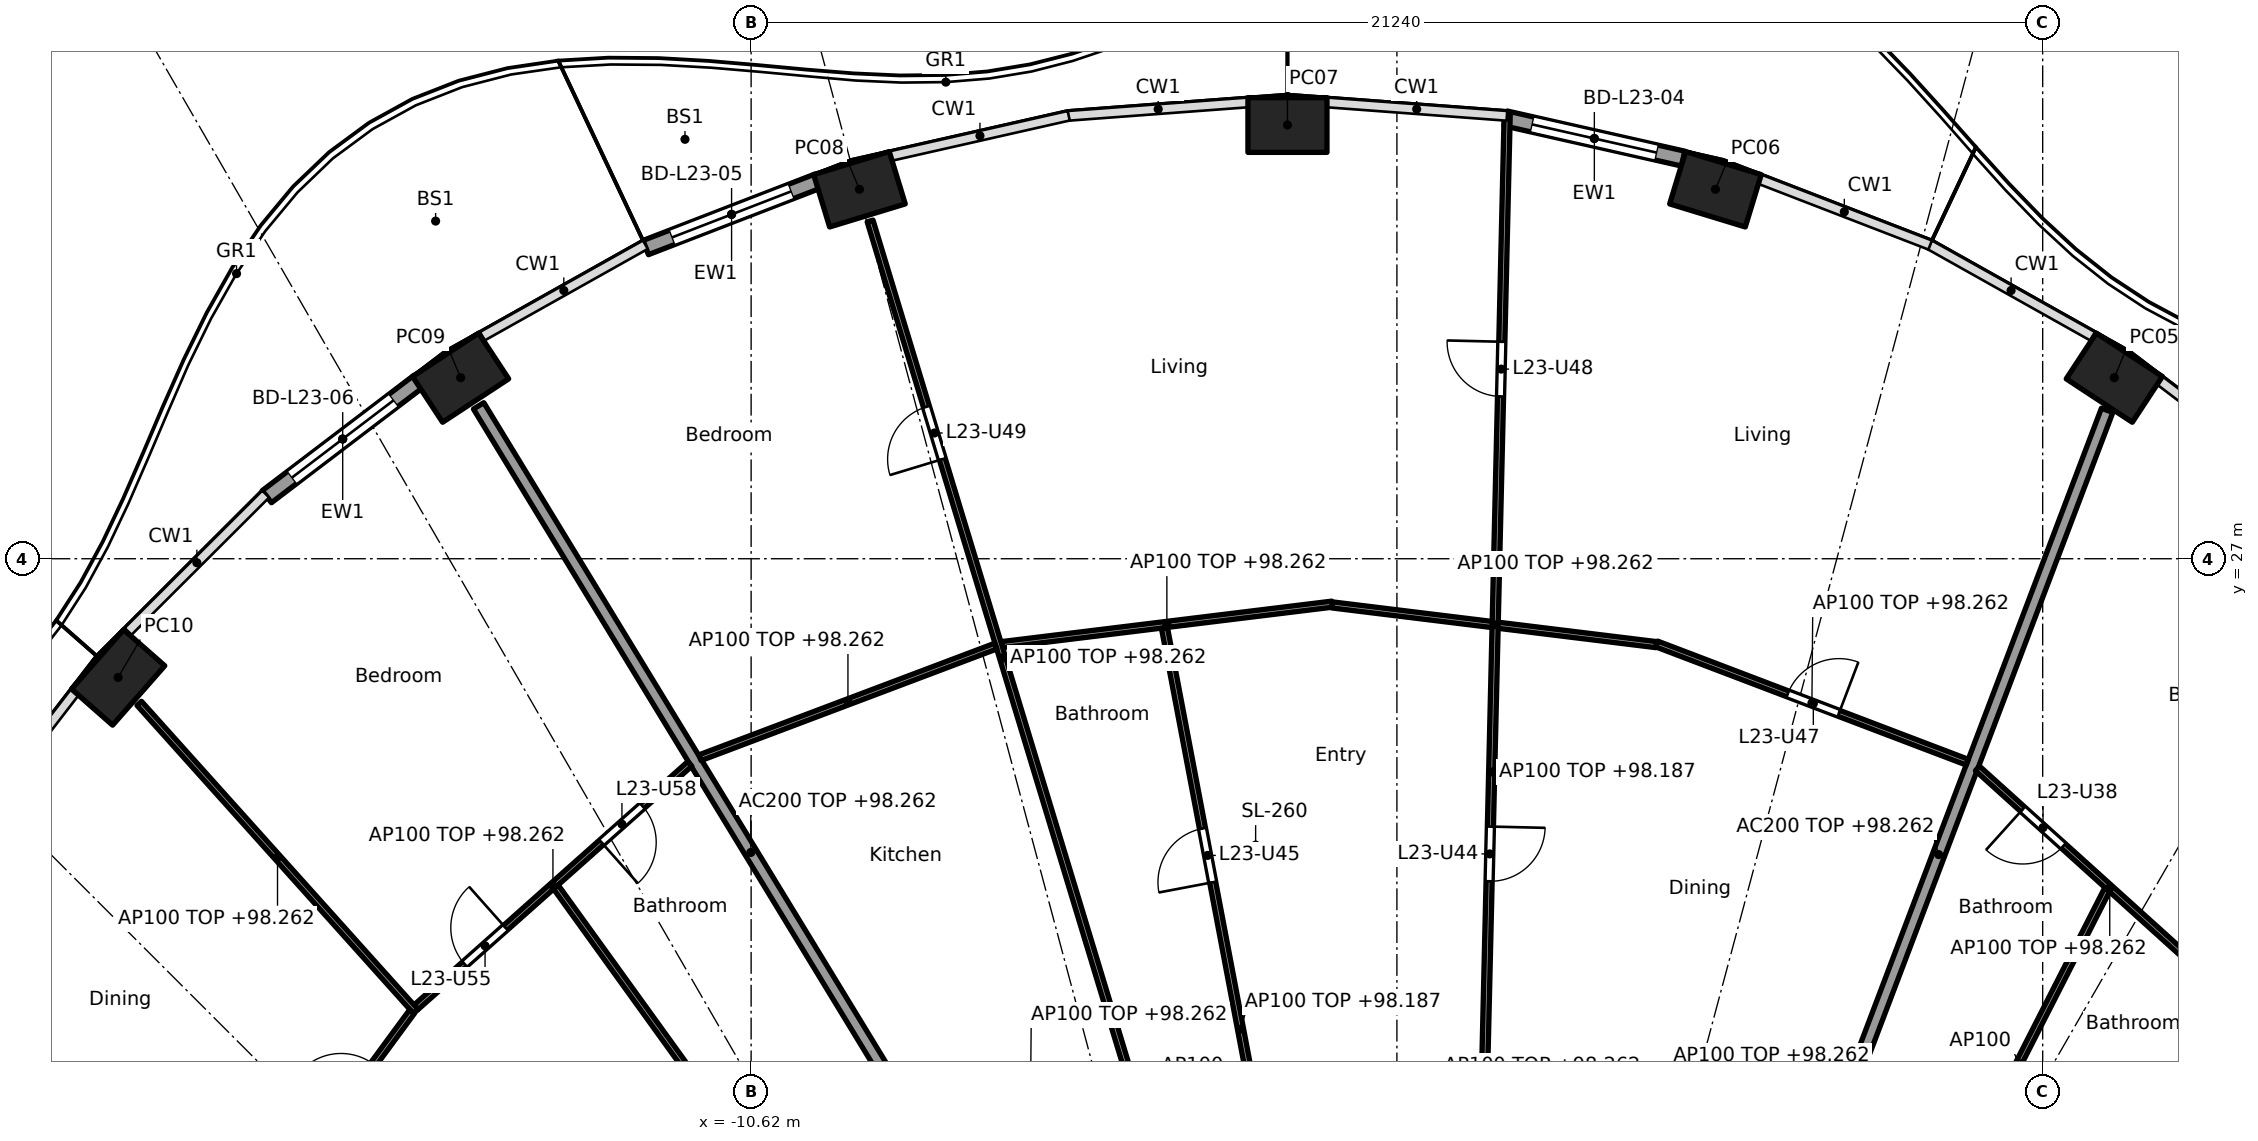
"""IFC4 building model, lengths in metres.
Left out: names, types, materials, properties, quantities, classifications, styles, units other than length and angle.
Written with IfcOpenShell. Run it as: python <this file> out.ifc"""

import sys

from ifc_helpers import new_model, si_unit, direction, frame, frame_2d, origin, origin_2d, place, context, subcontext, project, spatial, rectangle, hollow_rectangle, extrude, element, fill, save


model = new_model("IFC4")
c1 = context("Model", 3, precision=1e-05, world=origin(), true_north=direction((0.0, 1.0)))
c2 = subcontext(c1, "Body", "Model", "MODEL_VIEW")
j1 = project(units=[si_unit("LENGTHUNIT", "METRE"), si_unit("PLANEANGLEUNIT", "RADIAN")], contexts=[c1])
p1 = place(None, origin())
s1 = spatial("IfcSite", under=j1, at=p1, CompositionType="ELEMENT")
p2 = place(p1, origin())
s2 = spatial("IfcBuilding", under=s1, at=p2, CompositionType="ELEMENT")
p3 = place(p2, frame((0.0, 0.0, 95.5)))
s3 = spatial("IfcBuildingStorey", under=s2, at=p3, CompositionType="ELEMENT", Elevation=95.5)
for number, where, z_axis, x_axis in (
    (1, (11.798, 29.978, 0.0), (0.0, 0.0, 1.0), (-0.836, 0.549, 0.0)),
    (2, (5.239, 33.076, 0.0), (0.0, 0.0, 1.0), (-0.957, 0.292, 0.0)),
    (3, (-1.8, 34.133, 0.0), (0.0, 0.0, 1.0), (-1.0, 0.0, 0.0)),
    (4, (-8.839, 33.076, 0.0), (0.0, 0.0, 1.0), (-0.957, -0.292, 0.0)),
    (5, (-15.397, 29.978, 0.0), (0.0, 0.0, 1.0), (-0.836, -0.549, 0.0)),
    (6, (-21.03, 25.049, 0.0), (0.0, 0.0, 1.0), (-0.66, -0.751, 0.0)),
):
    element("IfcColumn", number, at=place(p3, frame(where, z_axis=z_axis, x_axis=x_axis)), inside=s3, PredefinedType="COLUMN", context=c2, shape_type="SweptSolid", body=[
        extrude(hollow_rectangle(XDim=1.3, YDim=0.9, WallThickness=0.045, at=origin_2d()), origin(), (0.0, 0.0, 1.0), 3.7),
    ])
p4 = place(p3, frame((1.787, 34.241, 0.0), z_axis=(0.0, 0.0, 1.0), x_axis=(0.975317607872, -0.220806620767, 0.0)))
e7 = element("IfcWall", 7, at=p4, inside=s3, PredefinedType="SOLIDWALL", context=c2, shape_type="SweptSolid", body=[
    extrude(rectangle(XDim=2.993, YDim=0.25, at=frame_2d((1.497, 0.0))), origin(), (0.0, 0.0, 1.0), 3.44),
])
p5 = place(p4, frame((0.447, 0.0, 0.0)))
e8 = element("IfcOpeningElement", 8, at=p5, cuts=e7, PredefinedType="OPENING", context=c2, shape_type="SweptSolid", body=[
    extrude(rectangle(XDim=2.1, YDim=2.4, at=frame_2d((1.05, 1.2))), frame((0.0, 0.135, 0.0), z_axis=(0.0, -1.0, 0.0), x_axis=(1.0, 0.0, 0.0)), (0.0, 0.0, 1.0), 0.27),
])
p6 = place(p3, frame((-12.353, 32.117, 0.0), z_axis=(0.0, 0.0, 1.0), x_axis=(0.932827091302, 0.360324322982, 0.0)))
e9 = element("IfcWall", 9, at=p6, inside=s3, PredefinedType="SOLIDWALL", context=c2, shape_type="SweptSolid", body=[
    extrude(rectangle(XDim=3.027, YDim=0.25, at=frame_2d((1.514, 0.0))), origin(), (0.0, 0.0, 1.0), 3.44),
])
p7 = place(p6, frame((0.464, 0.0, 0.0)))
e10 = element("IfcOpeningElement", 10, at=p7, cuts=e9, PredefinedType="OPENING", context=c2, shape_type="SweptSolid", body=[
    extrude(rectangle(XDim=2.1, YDim=2.4, at=frame_2d((1.05, 1.2))), frame((0.0, 0.135, 0.0), z_axis=(0.0, -1.0, 0.0), x_axis=(1.0, 0.0, 0.0)), (0.0, 0.0, 1.0), 0.27),
])
p8 = place(p3, frame((-18.584, 28.021, 0.0), z_axis=(0.0, 0.0, 1.0), x_axis=(0.796037575978, 0.605247203736, 0.0)))
e11 = element("IfcWall", 11, at=p8, inside=s3, PredefinedType="SOLIDWALL", context=c2, shape_type="SweptSolid", body=[
    extrude(rectangle(XDim=3.134, YDim=0.25, at=frame_2d((1.567, 0.0))), origin(), (0.0, 0.0, 1.0), 3.44),
])
p9 = place(p8, frame((0.517, 0.0, 0.0)))
e12 = element("IfcOpeningElement", 12, at=p9, cuts=e11, PredefinedType="OPENING", context=c2, shape_type="SweptSolid", body=[
    extrude(rectangle(XDim=2.1, YDim=2.4, at=frame_2d((1.05, 1.2))), frame((0.0, 0.135, 0.0), z_axis=(0.0, -1.0, 0.0), x_axis=(1.0, 0.0, 0.0)), (0.0, 0.0, 1.0), 0.27),
])
p10 = place(p3, frame((6.141, 14.829, 0.0), z_axis=(0.0, 0.0, 1.0), x_axis=(0.354477134193, 0.935064682968, 0.0)))
e13 = element("IfcWall", 13, at=p10, inside=s3, PredefinedType="PARTITIONING", context=c2, shape_type="SweptSolid", body=[
    extrude(rectangle(XDim=15.626, YDim=0.2, at=frame_2d((7.813, 0.0))), origin(), (0.0, 0.0, 1.0), 2.762),
])
p11 = place(p3, frame((-6.149, 14.825, 0.0), z_axis=(0.0, 0.0, 1.0), x_axis=(-0.520412862249, 0.853914780763, 0.0)))
e14 = element("IfcWall", 14, at=p11, inside=s3, PredefinedType="PARTITIONING", context=c2, shape_type="SweptSolid", body=[
    extrude(rectangle(XDim=17.202, YDim=0.2, at=frame_2d((8.601, 0.0))), origin(), (0.0, 0.0, 1.0), 2.762),
])
p12 = place(p3, frame((7.713, 10.195, 0.0), z_axis=(0.0, 0.0, 1.0), x_axis=(0.552111071171, 0.833770571015, 0.0)))
e15 = element("IfcWall", 15, at=p12, inside=s3, PredefinedType="PARTITIONING", context=c2, shape_type="SweptSolid", body=[
    extrude(rectangle(XDim=17.208, YDim=0.1, at=frame_2d((8.604, 0.0))), origin(), (0.0, 0.0, 1.0), 2.687),
])
p13 = place(p12, frame((1.976, 0.0, 0.0)))
e16 = element("IfcOpeningElement", 16, at=p13, cuts=e15, PredefinedType="OPENING", context=c2, shape_type="SweptSolid", body=[
    extrude(rectangle(XDim=0.9, YDim=2.1, at=frame_2d((0.45, 1.05))), frame((0.0, 0.06, 0.0), z_axis=(0.0, -1.0, 0.0), x_axis=(1.0, 0.0, 0.0)), (0.0, 0.0, 1.0), 0.12),
])
p14 = place(p12, frame((7.611, 0.0, 0.0)))
e17 = element("IfcOpeningElement", 17, at=p14, cuts=e15, PredefinedType="OPENING", context=c2, shape_type="SweptSolid", body=[
    extrude(rectangle(XDim=0.9, YDim=2.1, at=frame_2d((0.45, 1.05))), frame((0.0, 0.06, 0.0), z_axis=(0.0, -1.0, 0.0), x_axis=(1.0, 0.0, 0.0)), (0.0, 0.0, 1.0), 0.12),
])
p15 = place(p12, frame((13.79, 0.0, 0.0)))
e18 = element("IfcOpeningElement", 18, at=p15, cuts=e15, PredefinedType="OPENING", context=c2, shape_type="SweptSolid", body=[
    extrude(rectangle(XDim=0.9, YDim=2.1, at=frame_2d((0.45, 1.05))), frame((0.0, 0.06, 0.0), z_axis=(0.0, -1.0, 0.0), x_axis=(1.0, 0.0, 0.0)), (0.0, 0.0, 1.0), 0.12),
])
p16 = place(p3, frame((13.898, 19.625, 0.0), z_axis=(0.0, 0.0, 1.0), x_axis=(-0.742396654702, 0.669960601146, 0.0)))
e19 = element("IfcWall", 19, at=p16, inside=s3, PredefinedType="PARTITIONING", context=c2, shape_type="SweptSolid", body=[
    extrude(rectangle(XDim=5.861, YDim=0.1, at=frame_2d((2.931, 0.0))), origin(), (0.0, 0.0, 1.0), 2.762),
])
p17 = place(p16, frame((3.958, 0.0, 0.0)))
e20 = element("IfcOpeningElement", 20, at=p17, cuts=e19, PredefinedType="OPENING", context=c2, shape_type="SweptSolid", body=[
    extrude(rectangle(XDim=0.9, YDim=2.1, at=frame_2d((0.45, 1.05))), frame((0.0, 0.06, 0.0), z_axis=(0.0, -1.0, 0.0), x_axis=(1.0, 0.0, 0.0)), (0.0, 0.0, 1.0), 0.12),
])
p18 = place(p3, frame((8.769, 15.846, 0.0), z_axis=(0.0, 0.0, 1.0), x_axis=(0.454067187552, 0.890967445639, 0.0)))
e21 = element("IfcWall", 21, at=p18, inside=s3, PredefinedType="PARTITIONING", context=c2, shape_type="SweptSolid", body=[
    extrude(rectangle(XDim=6.414, YDim=0.1, at=frame_2d((3.207, 0.0))), origin(), (0.0, 0.0, 1.0), 3.44),
])
p19 = place(p3, frame((9.379, 23.655, 0.0), z_axis=(0.0, 0.0, 1.0), x_axis=(-0.934609369022, 0.355675873986, 0.0)))
e22 = element("IfcWall", 22, at=p19, inside=s3, PredefinedType="PARTITIONING", context=c2, shape_type="SweptSolid", body=[
    extrude(rectangle(XDim=5.467, YDim=0.1, at=frame_2d((2.733, 0.0))), origin(), (0.0, 0.0, 1.0), 2.762),
])
p20 = place(p19, frame((2.258, 0.0, 0.0)))
e23 = element("IfcOpeningElement", 23, at=p20, cuts=e22, PredefinedType="OPENING", context=c2, shape_type="SweptSolid", body=[
    extrude(rectangle(XDim=0.9, YDim=2.1, at=frame_2d((0.45, 1.05))), frame((0.0, 0.06, 0.0), z_axis=(0.0, -1.0, 0.0), x_axis=(1.0, 0.0, 0.0)), (0.0, 0.0, 1.0), 0.12),
])
p21 = place(p3, frame((4.267, 25.587, 0.0), z_axis=(0.0, 0.0, 1.0), x_axis=(-0.992576206119, 0.121624319302, 0.0)))
e24 = element("IfcWall", 24, at=p21, inside=s3, PredefinedType="PARTITIONING", context=c2, shape_type="SweptSolid", body=[
    extrude(rectangle(XDim=5.374, YDim=0.1, at=frame_2d((2.687, 0.0))), origin(), (0.0, 0.0, 1.0), 2.762),
])
p22 = place(p3, frame((1.303, 12.665, 0.0), z_axis=(0.0, 0.0, 1.0), x_axis=(0.023564110689, 0.999722327793, 0.0)))
e25 = element("IfcWall", 25, at=p22, inside=s3, PredefinedType="PARTITIONING", context=c2, shape_type="SweptSolid", body=[
    extrude(rectangle(XDim=21.664, YDim=0.1, at=frame_2d((10.832, 0.0))), origin(), (0.0, 0.0, 1.0), 2.687),
])
p23 = place(p22, frame((2.407, 0.0, 0.0)))
e26 = element("IfcOpeningElement", 26, at=p23, cuts=e25, PredefinedType="OPENING", context=c2, shape_type="SweptSolid", body=[
    extrude(rectangle(XDim=0.9, YDim=2.1, at=frame_2d((0.45, 1.05))), frame((0.0, 0.06, 0.0), z_axis=(0.0, -1.0, 0.0), x_axis=(1.0, 0.0, 0.0)), (0.0, 0.0, 1.0), 0.12),
])
p24 = place(p22, frame((9.034, 0.0, 0.0)))
e27 = element("IfcOpeningElement", 27, at=p24, cuts=e25, PredefinedType="OPENING", context=c2, shape_type="SweptSolid", body=[
    extrude(rectangle(XDim=0.9, YDim=2.1, at=frame_2d((0.45, 1.05))), frame((0.0, 0.06, 0.0), z_axis=(0.0, -1.0, 0.0), x_axis=(1.0, 0.0, 0.0)), (0.0, 0.0, 1.0), 0.12),
])
p25 = place(p22, frame((17.009, 0.0, 0.0)))
e28 = element("IfcOpeningElement", 28, at=p25, cuts=e25, PredefinedType="OPENING", context=c2, shape_type="SweptSolid", body=[
    extrude(rectangle(XDim=0.9, YDim=2.1, at=frame_2d((0.45, 1.05))), frame((0.0, 0.06, 0.0), z_axis=(0.0, -1.0, 0.0), x_axis=(1.0, 0.0, 0.0)), (0.0, 0.0, 1.0), 0.12),
])
p26 = place(p3, frame((-1.066, 26.253, 0.0), z_axis=(0.0, 0.0, 1.0), x_axis=(-0.992574853421, -0.121635358166, 0.0)))
e29 = element("IfcWall", 29, at=p26, inside=s3, PredefinedType="PARTITIONING", context=c2, shape_type="SweptSolid", body=[
    extrude(rectangle(XDim=5.473, YDim=0.1, at=frame_2d((2.737, 0.0))), origin(), (0.0, 0.0, 1.0), 2.762),
])
p27 = place(p3, frame((-1.32, 12.663, 0.0), z_axis=(0.0, 0.0, 1.0), x_axis=(-0.186308855238, 0.982491226658, 0.0)))
e30 = element("IfcWall", 30, at=p27, inside=s3, PredefinedType="PARTITIONING", context=c2, shape_type="SweptSolid", body=[
    extrude(rectangle(XDim=13.437, YDim=0.1, at=frame_2d((6.719, 0.0))), origin(), (0.0, 0.0, 1.0), 2.687),
])
p28 = place(p27, frame((2.458, 0.0, 0.0)))
e31 = element("IfcOpeningElement", 31, at=p28, cuts=e30, PredefinedType="OPENING", context=c2, shape_type="SweptSolid", body=[
    extrude(rectangle(XDim=0.9, YDim=2.1, at=frame_2d((0.45, 1.05))), frame((0.0, 0.06, 0.0), z_axis=(0.0, -1.0, 0.0), x_axis=(1.0, 0.0, 0.0)), (0.0, 0.0, 1.0), 0.12),
])
p29 = place(p27, frame((9.177, 0.0, 0.0)))
e32 = element("IfcOpeningElement", 32, at=p29, cuts=e30, PredefinedType="OPENING", context=c2, shape_type="SweptSolid", body=[
    extrude(rectangle(XDim=0.9, YDim=2.1, at=frame_2d((0.45, 1.05))), frame((0.0, 0.06, 0.0), z_axis=(0.0, -1.0, 0.0), x_axis=(1.0, 0.0, 0.0)), (0.0, 0.0, 1.0), 0.12),
])
p30 = place(p3, frame((-4.306, 18.185, 0.0), z_axis=(0.0, 0.0, 1.0), x_axis=(-0.290183838394, 0.956970919064, 0.0)))
e33 = element("IfcWall", 33, at=p30, inside=s3, PredefinedType="PARTITIONING", context=c2, shape_type="SweptSolid", body=[
    extrude(rectangle(XDim=15.015, YDim=0.1, at=frame_2d((7.508, 0.0))), origin(), (0.0, 0.0, 1.0), 2.762),
])
p31 = place(p30, frame((10.922, 0.0, 0.0)))
e34 = element("IfcOpeningElement", 34, at=p31, cuts=e33, PredefinedType="OPENING", context=c2, shape_type="SweptSolid", body=[
    extrude(rectangle(XDim=0.9, YDim=2.1, at=frame_2d((0.45, 1.05))), frame((0.0, 0.06, 0.0), z_axis=(0.0, -1.0, 0.0), x_axis=(1.0, 0.0, 0.0)), (0.0, 0.0, 1.0), 0.12),
])
p32 = place(p3, frame((-6.596, 25.563, 0.0), z_axis=(0.0, 0.0, 1.0), x_axis=(-0.935624838262, -0.352995980185, 0.0)))
e35 = element("IfcWall", 35, at=p32, inside=s3, PredefinedType="PARTITIONING", context=c2, shape_type="SweptSolid", body=[
    extrude(rectangle(XDim=5.199, YDim=0.1, at=frame_2d((2.6, 0.0))), origin(), (0.0, 0.0, 1.0), 2.762),
])
p33 = place(p3, frame((-11.628, 23.626, 0.0), z_axis=(0.0, 0.0, 1.0), x_axis=(-0.747429444005, -0.664341197153, 0.0)))
e36 = element("IfcWall", 36, at=p33, inside=s3, PredefinedType="PARTITIONING", context=c2, shape_type="SweptSolid", body=[
    extrude(rectangle(XDim=6.024, YDim=0.1, at=frame_2d((3.012, 0.0))), origin(), (0.0, 0.0, 1.0), 2.762),
])
p34 = place(p33, frame((4.055, 0.0, 0.0)))
e37 = element("IfcOpeningElement", 37, at=p34, cuts=e36, PredefinedType="OPENING", context=c2, shape_type="SweptSolid", body=[
    extrude(rectangle(XDim=0.9, YDim=2.1, at=frame_2d((0.45, 1.05))), frame((0.0, 0.06, 0.0), z_axis=(0.0, -1.0, 0.0), x_axis=(1.0, 0.0, 0.0)), (0.0, 0.0, 1.0), 0.12),
])
p35 = place(p33, frame((1.043, 0.0, 0.0)))
e38 = element("IfcOpeningElement", 38, at=p35, cuts=e36, PredefinedType="OPENING", context=c2, shape_type="SweptSolid", body=[
    extrude(rectangle(XDim=0.9, YDim=2.1, at=frame_2d((0.45, 1.05))), frame((0.0, 0.06, 0.0), z_axis=(0.0, -1.0, 0.0), x_axis=(1.0, 0.0, 0.0)), (0.0, 0.0, 1.0), 0.12),
])
p36 = place(p3, frame((-6.49, 11.419, 0.0), z_axis=(0.0, 0.0, 1.0), x_axis=(-0.584832823883, 0.811153849839, 0.0)))
e39 = element("IfcWall", 39, at=p36, inside=s3, PredefinedType="PARTITIONING", context=c2, shape_type="SweptSolid", body=[
    extrude(rectangle(XDim=12.553, YDim=0.1, at=frame_2d((6.277, 0.0))), origin(), (0.0, 0.0, 1.0), 2.687),
])
p37 = place(p36, frame((4.166, 0.0, 0.0)))
e40 = element("IfcOpeningElement", 40, at=p37, cuts=e39, PredefinedType="OPENING", context=c2, shape_type="SweptSolid", body=[
    extrude(rectangle(XDim=0.9, YDim=2.1, at=frame_2d((0.45, 1.05))), frame((0.0, 0.06, 0.0), z_axis=(0.0, -1.0, 0.0), x_axis=(1.0, 0.0, 0.0)), (0.0, 0.0, 1.0), 0.12),
])
p38 = place(p3, frame((-16.134, 19.554, 0.0), z_axis=(0.0, 0.0, 1.0), x_axis=(-0.667985610263, 0.74417418961, 0.0)))
e41 = element("IfcWall", 41, at=p38, inside=s3, PredefinedType="PARTITIONING", context=c2, shape_type="SweptSolid", body=[
    extrude(rectangle(XDim=6.809, YDim=0.1, at=frame_2d((3.405, 0.0))), origin(), (0.0, 0.0, 1.0), 2.762),
])
p39 = place(p3, frame((-16.197, 19.551, 0.0), z_axis=(0.0, 0.0, 1.0), x_axis=(-0.592391983588, -0.80564988536, 0.0)))
e42 = element("IfcWall", 42, at=p39, inside=s3, PredefinedType="PARTITIONING", context=c2, shape_type="SweptSolid", body=[
    extrude(rectangle(XDim=6.08, YDim=0.1, at=frame_2d((3.04, 0.0))), origin(), (0.0, 0.0, 1.0), 2.762),
])
p40 = place(p39, frame((1.07, 0.0, 0.0)))
e43 = element("IfcOpeningElement", 43, at=p40, cuts=e42, PredefinedType="OPENING", context=c2, shape_type="SweptSolid", body=[
    extrude(rectangle(XDim=0.9, YDim=2.1, at=frame_2d((0.45, 1.05))), frame((0.0, 0.06, 0.0), z_axis=(0.0, -1.0, 0.0), x_axis=(1.0, 0.0, 0.0)), (0.0, 0.0, 1.0), 0.12),
])
p41 = place(p5, origin())
e44 = element("IfcDoor", 44, at=p41, inside=s3, OperationType="SLIDING_TO_LEFT", PredefinedType="DOOR", context=c2, shape_type="SweptSolid", body=[
    extrude(rectangle(XDim=2.1, YDim=2.4, at=frame_2d((1.05, 1.2))), frame((0.0, 0.025, 0.0), z_axis=(0.0, -1.0, 0.0), x_axis=(1.0, 0.0, 0.0)), (0.0, 0.0, 1.0), 0.05),
])
fill(e8, e44)
p42 = place(p7, origin())
e45 = element("IfcDoor", 45, at=p42, inside=s3, OperationType="SLIDING_TO_LEFT", PredefinedType="DOOR", context=c2, shape_type="SweptSolid", body=[
    extrude(rectangle(XDim=2.1, YDim=2.4, at=frame_2d((1.05, 1.2))), frame((0.0, 0.025, 0.0), z_axis=(0.0, -1.0, 0.0), x_axis=(1.0, 0.0, 0.0)), (0.0, 0.0, 1.0), 0.05),
])
fill(e10, e45)
p43 = place(p9, origin())
e46 = element("IfcDoor", 46, at=p43, inside=s3, OperationType="SLIDING_TO_LEFT", PredefinedType="DOOR", context=c2, shape_type="SweptSolid", body=[
    extrude(rectangle(XDim=2.1, YDim=2.4, at=frame_2d((1.05, 1.2))), frame((0.0, 0.025, 0.0), z_axis=(0.0, -1.0, 0.0), x_axis=(1.0, 0.0, 0.0)), (0.0, 0.0, 1.0), 0.05),
])
fill(e12, e46)
p44 = place(p17, origin())
e47 = element("IfcDoor", 47, at=p44, inside=s3, OperationType="SINGLE_SWING_RIGHT", PredefinedType="DOOR", context=c2, shape_type="SweptSolid", body=[
    extrude(rectangle(XDim=0.9, YDim=2.1, at=frame_2d((0.45, 1.05))), frame((0.0, 0.025, 0.0), z_axis=(0.0, -1.0, 0.0), x_axis=(1.0, 0.0, 0.0)), (0.0, 0.0, 1.0), 0.05),
])
fill(e20, e47)
p45 = place(p24, frame((0.9, 0.0, 0.0), x_axis=(-1.0, 0.0, 0.0)))
e48 = element("IfcDoor", 48, at=p45, inside=s3, OperationType="SINGLE_SWING_LEFT", PredefinedType="DOOR", context=c2, shape_type="SweptSolid", body=[
    extrude(rectangle(XDim=0.9, YDim=2.1, at=frame_2d((0.45, 1.05))), frame((0.0, 0.025, 0.0), z_axis=(0.0, -1.0, 0.0), x_axis=(1.0, 0.0, 0.0)), (0.0, 0.0, 1.0), 0.05),
])
fill(e27, e48)
p46 = place(p29, origin())
e49 = element("IfcDoor", 49, at=p46, inside=s3, OperationType="SINGLE_SWING_LEFT", PredefinedType="DOOR", context=c2, shape_type="SweptSolid", body=[
    extrude(rectangle(XDim=0.9, YDim=2.1, at=frame_2d((0.45, 1.05))), frame((0.0, 0.025, 0.0), z_axis=(0.0, -1.0, 0.0), x_axis=(1.0, 0.0, 0.0)), (0.0, 0.0, 1.0), 0.05),
])
fill(e32, e49)
p47 = place(p20, frame((0.9, 0.0, 0.0), x_axis=(-1.0, 0.0, 0.0)))
e50 = element("IfcDoor", 50, at=p47, inside=s3, OperationType="SINGLE_SWING_RIGHT", PredefinedType="DOOR", context=c2, shape_type="SweptSolid", body=[
    extrude(rectangle(XDim=0.9, YDim=2.1, at=frame_2d((0.45, 1.05))), frame((0.0, 0.025, 0.0), z_axis=(0.0, -1.0, 0.0), x_axis=(1.0, 0.0, 0.0)), (0.0, 0.0, 1.0), 0.05),
])
fill(e23, e50)
p48 = place(p25, origin())
e51 = element("IfcDoor", 51, at=p48, inside=s3, OperationType="SINGLE_SWING_RIGHT", PredefinedType="DOOR", context=c2, shape_type="SweptSolid", body=[
    extrude(rectangle(XDim=0.9, YDim=2.1, at=frame_2d((0.45, 1.05))), frame((0.0, 0.025, 0.0), z_axis=(0.0, -1.0, 0.0), x_axis=(1.0, 0.0, 0.0)), (0.0, 0.0, 1.0), 0.05),
])
fill(e28, e51)
p49 = place(p31, origin())
e52 = element("IfcDoor", 52, at=p49, inside=s3, OperationType="SINGLE_SWING_LEFT", PredefinedType="DOOR", context=c2, shape_type="SweptSolid", body=[
    extrude(rectangle(XDim=0.9, YDim=2.1, at=frame_2d((0.45, 1.05))), frame((0.0, 0.025, 0.0), z_axis=(0.0, -1.0, 0.0), x_axis=(1.0, 0.0, 0.0)), (0.0, 0.0, 1.0), 0.05),
])
fill(e34, e52)
p50 = place(p34, frame((0.9, 0.0, 0.0), x_axis=(-1.0, 0.0, 0.0)))
e53 = element("IfcDoor", 53, at=p50, inside=s3, OperationType="SINGLE_SWING_RIGHT", PredefinedType="DOOR", context=c2, shape_type="SweptSolid", body=[
    extrude(rectangle(XDim=0.9, YDim=2.1, at=frame_2d((0.45, 1.05))), frame((0.0, 0.025, 0.0), z_axis=(0.0, -1.0, 0.0), x_axis=(1.0, 0.0, 0.0)), (0.0, 0.0, 1.0), 0.05),
])
fill(e37, e53)
p51 = place(p35, origin())
e54 = element("IfcDoor", 54, at=p51, inside=s3, OperationType="SINGLE_SWING_RIGHT", PredefinedType="DOOR", context=c2, shape_type="SweptSolid", body=[
    extrude(rectangle(XDim=0.9, YDim=2.1, at=frame_2d((0.45, 1.05))), frame((0.0, 0.025, 0.0), z_axis=(0.0, -1.0, 0.0), x_axis=(1.0, 0.0, 0.0)), (0.0, 0.0, 1.0), 0.05),
])
fill(e38, e54)
save(model, sys.argv[1])
